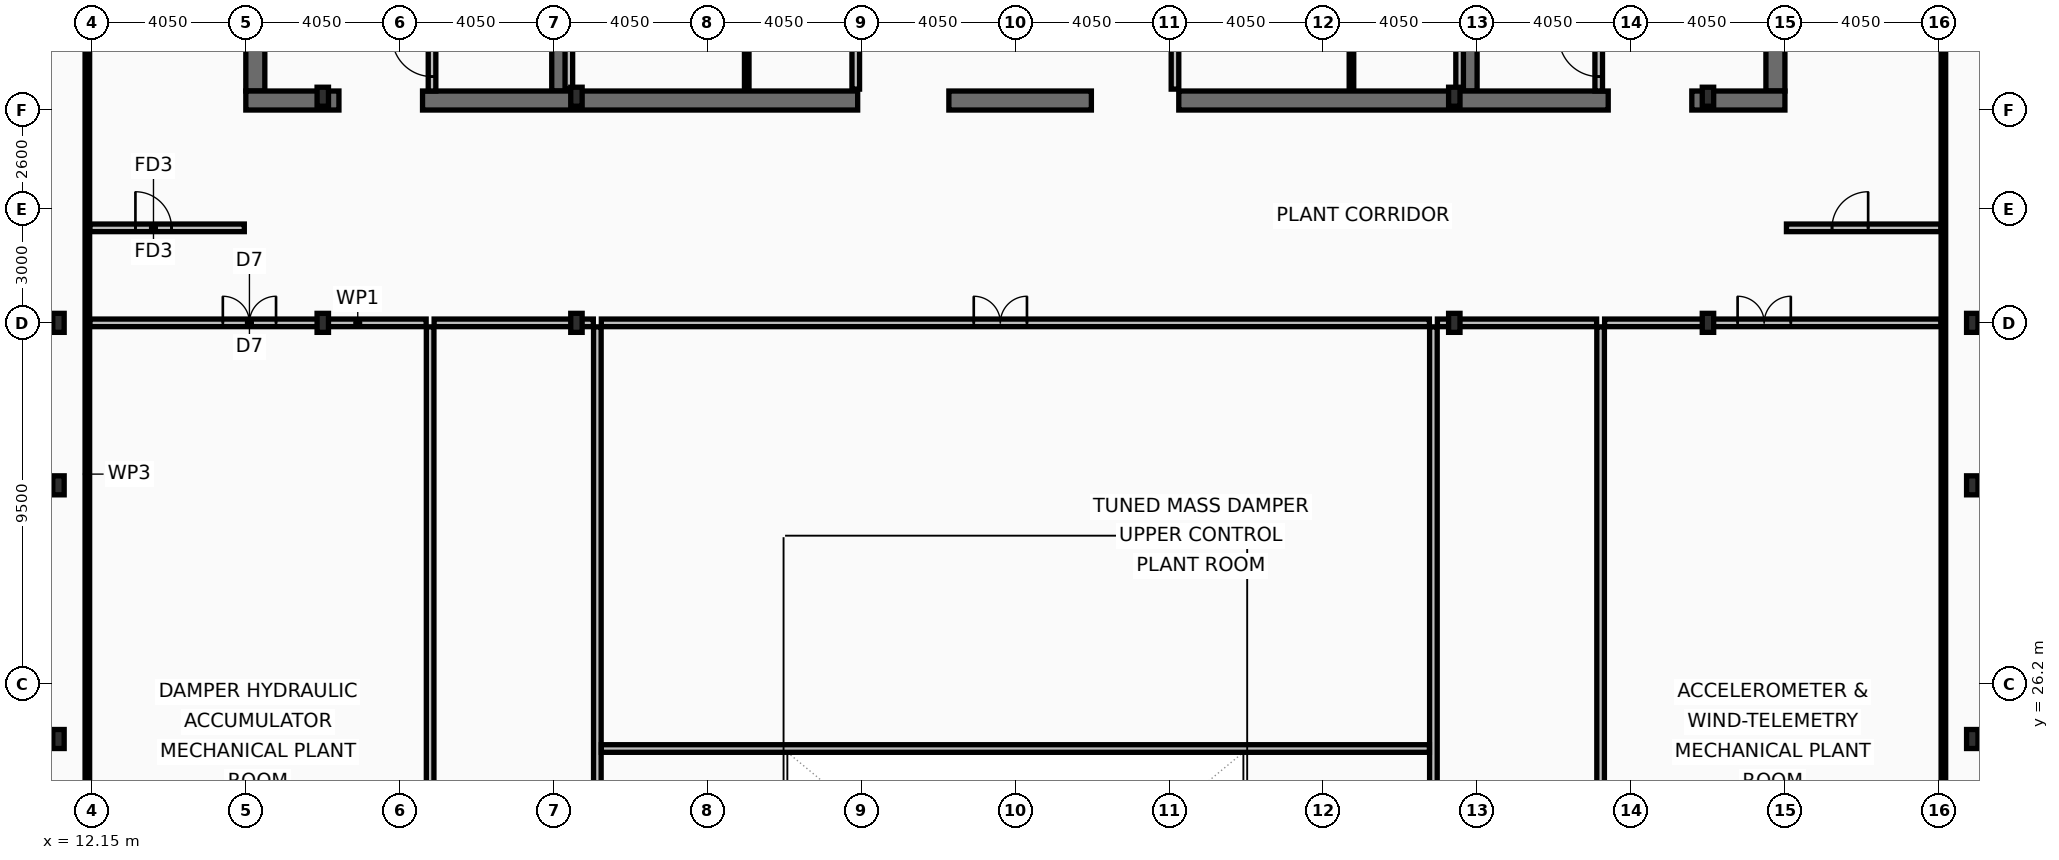
"""IFC4 building model, lengths in metres.
Left out: names, types, materials, properties, quantities, classifications, styles, units other than length and angle.
Written with IfcOpenShell. Run it as: python <this file> out.ifc"""

import sys

from ifc_helpers import new_model, si_unit, direction, frame, frame_2d, origin, origin_2d, place, context, subcontext, project, spatial, rectangle, i_section, extrude, element, fill, save


model = new_model("IFC4")
c1 = context("Model", 3, precision=1e-05, world=origin(), true_north=direction((0.0, 1.0)))
c2 = subcontext(c1, "Body", "Model", "MODEL_VIEW")
j1 = project(units=[si_unit("LENGTHUNIT", "METRE"), si_unit("PLANEANGLEUNIT", "RADIAN")], contexts=[c1])
p1 = place(None, origin())
s1 = spatial("IfcSite", under=j1, at=p1, CompositionType="ELEMENT")
p2 = place(p1, origin())
s2 = spatial("IfcBuilding", under=s1, at=p2, CompositionType="ELEMENT")
p3 = place(p2, frame((0.0, 0.0, 356.2)))
s3 = spatial("IfcBuildingStorey", under=s2, at=p3, CompositionType="ELEMENT", Elevation=356.2)
for number, where, z_axis, x_axis in (
    (1, (16.45, 41.8, 0.0), (0.0, 0.0, 1.0), (0.0, 1.0, 0.0)),
    (2, (56.45, 53.2, 0.0), (0.0, 0.0, 1.0), (0.0, -1.0, 0.0)),
):
    element("IfcWall", number, at=place(p3, frame(where, z_axis=z_axis, x_axis=x_axis)), inside=s3, PredefinedType="SHEAR", context=c2, shape_type="SweptSolid", body=[
        extrude(rectangle(XDim=11.4, YDim=0.5, at=frame_2d((5.7, 0.0))), origin(), (0.0, 0.0, 1.0), 5.4),
    ])
for number, where, z_axis, x_axis in (
    (3, (24.45, 41.8, 0.0), (0.0, 0.0, 1.0), (0.0, 1.0, 0.0)),
    (4, (48.4, 41.8, 0.0), (0.0, 0.0, 1.0), (0.0, 1.0, 0.0)),
):
    element("IfcWall", number, at=place(p3, frame(where, z_axis=z_axis, x_axis=x_axis)), inside=s3, PredefinedType="SHEAR", context=c2, shape_type="SweptSolid", body=[
        extrude(rectangle(XDim=11.4, YDim=0.4, at=frame_2d((5.7, 0.0))), origin(), (0.0, 0.0, 1.0), 5.4),
    ])
p4 = place(p3, frame((18.65, 41.55, 0.0), z_axis=(0.0, 0.0, 1.0), x_axis=(-1.0, 0.0, 0.0)))
e5 = element("IfcWall", 5, at=p4, inside=s3, PredefinedType="SHEAR", context=c2, shape_type="SweptSolid", body=[
    extrude(rectangle(XDim=2.45, YDim=0.5, at=frame_2d((1.225, 0.0))), origin(), (0.0, 0.0, 1.0), 5.4),
])
p5 = place(p3, frame((32.3, 41.55, 0.0), z_axis=(0.0, 0.0, 1.0), x_axis=(-1.0, 0.0, 0.0)))
e6 = element("IfcWall", 6, at=p5, inside=s3, PredefinedType="SHEAR", context=c2, shape_type="SweptSolid", body=[
    extrude(rectangle(XDim=11.45, YDim=0.5, at=frame_2d((5.725, 0.0))), origin(), (0.0, 0.0, 1.0), 5.4),
])
p6 = place(p3, frame((38.45, 41.55, 0.0), z_axis=(0.0, 0.0, 1.0), x_axis=(-1.0, 0.0, 0.0)))
e7 = element("IfcWall", 7, at=p6, inside=s3, PredefinedType="SHEAR", context=c2, shape_type="SweptSolid", body=[
    extrude(rectangle(XDim=3.75, YDim=0.5, at=frame_2d((1.875, 0.0))), origin(), (0.0, 0.0, 1.0), 5.4),
])
p7 = place(p3, frame((52.05, 41.55, 0.0), z_axis=(0.0, 0.0, 1.0), x_axis=(-1.0, 0.0, 0.0)))
e8 = element("IfcWall", 8, at=p7, inside=s3, PredefinedType="SHEAR", context=c2, shape_type="SweptSolid", body=[
    extrude(rectangle(XDim=11.3, YDim=0.5, at=frame_2d((5.65, 0.0))), origin(), (0.0, 0.0, 1.0), 5.4),
])
p8 = place(p3, frame((56.7, 41.55, 0.0), z_axis=(0.0, 0.0, 1.0), x_axis=(-1.0, 0.0, 0.0)))
e9 = element("IfcWall", 9, at=p8, inside=s3, PredefinedType="SHEAR", context=c2, shape_type="SweptSolid", body=[
    extrude(rectangle(XDim=2.45, YDim=0.5, at=frame_2d((1.225, 0.0))), origin(), (0.0, 0.0, 1.0), 5.4),
])
for number, where, z_axis, x_axis in (
    (10, (11.27, 24.75, 0.0), (0.0, 0.0, 1.0), (1.0, 0.0, 0.0)),
    (11, (11.27, 31.425, 0.0), (0.0, 0.0, 1.0), (1.0, 0.0, 0.0)),
    (12, (11.27, 35.7, 0.0), (0.0, 0.0, 1.0), (1.0, 0.0, 0.0)),
    (13, (61.63, 24.75, 0.0), (0.0, 0.0, 1.0), (1.0, 0.0, 0.0)),
    (14, (61.63, 31.425, 0.0), (0.0, 0.0, 1.0), (1.0, 0.0, 0.0)),
    (15, (61.63, 35.7, 0.0), (0.0, 0.0, 1.0), (1.0, 0.0, 0.0)),
    (16, (18.225, 35.7, 0.0), (0.0, 0.0, 1.0), (1.0, 0.0, 0.0)),
    (17, (18.225, 41.65, 0.0), (0.0, 0.0, 1.0), (1.0, 0.0, 0.0)),
    (18, (24.9, 35.7, 0.0), (0.0, 0.0, 1.0), (1.0, 0.0, 0.0)),
    (19, (24.9, 41.65, 0.0), (0.0, 0.0, 1.0), (1.0, 0.0, 0.0)),
    (20, (48.0, 35.7, 0.0), (0.0, 0.0, 1.0), (1.0, 0.0, 0.0)),
    (21, (48.0, 41.65, 0.0), (0.0, 0.0, 1.0), (1.0, 0.0, 0.0)),
    (22, (54.675, 35.7, 0.0), (0.0, 0.0, 1.0), (1.0, 0.0, 0.0)),
    (23, (54.675, 41.65, 0.0), (0.0, 0.0, 1.0), (1.0, 0.0, 0.0)),
):
    element("IfcColumn", number, at=place(p3, frame(where, z_axis=z_axis, x_axis=x_axis)), inside=s3, PredefinedType="COLUMN", context=c2, shape_type="SweptSolid", body=[
        extrude(i_section(OverallWidth=0.3, OverallDepth=0.5, WebThickness=0.014, FlangeThickness=0.028, at=origin_2d()), origin(), (0.0, 0.0, 1.0), 5.6),
    ])
p9 = place(p3, frame((21.1, 41.8, 0.0), z_axis=(0.0, 0.0, 1.0), x_axis=(0.0, 1.0, 0.0)))
e24 = element("IfcWall", 24, at=p9, inside=s3, PredefinedType="PARTITIONING", context=c2, shape_type="SweptSolid", body=[
    extrude(rectangle(XDim=2.695, YDim=0.2, at=frame_2d((1.348, 0.0))), origin(), (0.0, 0.0, 1.0), 5.4),
])
p10 = place(p9, frame((0.38, 0.0, 0.0)))
e25 = element("IfcOpeningElement", 25, at=p10, cuts=e24, PredefinedType="OPENING", context=c2, shape_type="SweptSolid", body=[
    extrude(rectangle(XDim=1.05, YDim=2.15, at=frame_2d((0.525, 1.075))), frame((0.0, 0.11, 0.0), z_axis=(0.0, -1.0, 0.0), x_axis=(1.0, 0.0, 0.0)), (0.0, 0.0, 1.0), 0.22),
])
p11 = place(p3, frame((51.8, 41.8, 0.0), z_axis=(0.0, 0.0, 1.0), x_axis=(0.0, 1.0, 0.0)))
e26 = element("IfcWall", 26, at=p11, inside=s3, PredefinedType="PARTITIONING", context=c2, shape_type="SweptSolid", body=[
    extrude(rectangle(XDim=2.695, YDim=0.2, at=frame_2d((1.348, 0.0))), origin(), (0.0, 0.0, 1.0), 5.4),
])
p12 = place(p11, frame((0.38, 0.0, 0.0)))
e27 = element("IfcOpeningElement", 27, at=p12, cuts=e26, PredefinedType="OPENING", context=c2, shape_type="SweptSolid", body=[
    extrude(rectangle(XDim=1.05, YDim=2.15, at=frame_2d((0.525, 1.075))), frame((0.0, 0.11, 0.0), z_axis=(0.0, -1.0, 0.0), x_axis=(1.0, 0.0, 0.0)), (0.0, 0.0, 1.0), 0.22),
])
for number, where, z_axis, x_axis in (
    (28, (24.7, 41.85, 0.0), (0.0, 0.0, 1.0), (0.0, 1.0, 0.0)),
    (29, (32.25, 41.85, 0.0), (0.0, 0.0, 1.0), (0.0, 1.0, 0.0)),
):
    element("IfcWall", number, at=place(p3, frame(where, z_axis=z_axis, x_axis=x_axis)), inside=s3, PredefinedType="PARTITIONING", context=c2, shape_type="SweptSolid", body=[
        extrude(rectangle(XDim=2.395, YDim=0.2, at=frame_2d((1.198, 0.0))), origin(), (0.0, 0.0, 1.0), 5.4),
    ])
p13 = place(p3, frame((29.381, 41.85, 0.0), z_axis=(0.0, 0.0, 1.0), x_axis=(0.0, 1.0, 0.0)))
e30 = element("IfcWall", 30, at=p13, inside=s3, PredefinedType="PARTITIONING", context=c2, shape_type="SweptSolid", body=[
    extrude(rectangle(XDim=2.395, YDim=0.12, at=frame_2d((1.198, 0.0))), origin(), (0.0, 0.0, 1.0), 5.4),
])
for number, where, z_axis, x_axis in (
    (31, (40.65, 41.85, 0.0), (0.0, 0.0, 1.0), (0.0, 1.0, 0.0)),
    (32, (48.14, 41.85, 0.0), (0.0, 0.0, 1.0), (0.0, 1.0, 0.0)),
):
    element("IfcWall", number, at=place(p3, frame(where, z_axis=z_axis, x_axis=x_axis)), inside=s3, PredefinedType="PARTITIONING", context=c2, shape_type="SweptSolid", body=[
        extrude(rectangle(XDim=2.395, YDim=0.2, at=frame_2d((1.198, 0.0))), origin(), (0.0, 0.0, 1.0), 5.4),
    ])
p14 = place(p3, frame((45.294, 41.85, 0.0), z_axis=(0.0, 0.0, 1.0), x_axis=(0.0, 1.0, 0.0)))
e33 = element("IfcWall", 33, at=p14, inside=s3, PredefinedType="PARTITIONING", context=c2, shape_type="SweptSolid", body=[
    extrude(rectangle(XDim=2.395, YDim=0.12, at=frame_2d((1.198, 0.0))), origin(), (0.0, 0.0, 1.0), 5.4),
])
p15 = place(p3, frame((12.095, 35.7, 0.0), z_axis=(0.0, 0.0, 1.0), x_axis=(1.0, 0.0, 0.0)))
e34 = element("IfcWall", 34, at=p15, inside=s3, PredefinedType="PARTITIONING", context=c2, shape_type="SweptSolid", body=[
    extrude(rectangle(XDim=8.85, YDim=0.2, at=frame_2d((4.425, 0.0))), origin(), (0.0, 0.0, 1.0), 4.79),
])
p16 = place(p15, frame((3.5, 0.0, 0.0)))
e35 = element("IfcOpeningElement", 35, at=p16, cuts=e34, PredefinedType="OPENING", context=c2, shape_type="SweptSolid", body=[
    extrude(rectangle(XDim=1.4, YDim=2.15, at=frame_2d((0.7, 1.075))), frame((0.0, 0.11, 0.0), z_axis=(0.0, -1.0, 0.0), x_axis=(1.0, 0.0, 0.0)), (0.0, 0.0, 1.0), 0.22),
])
p17 = place(p3, frame((21.155, 35.7, 0.0), z_axis=(0.0, 0.0, 1.0), x_axis=(1.0, 0.0, 0.0)))
e36 = element("IfcWall", 36, at=p17, inside=s3, PredefinedType="PARTITIONING", context=c2, shape_type="SweptSolid", body=[
    extrude(rectangle(XDim=4.19, YDim=0.2, at=frame_2d((2.095, 0.0))), origin(), (0.0, 0.0, 1.0), 4.79),
])
p18 = place(p3, frame((25.555, 35.7, 0.0), z_axis=(0.0, 0.0, 1.0), x_axis=(1.0, 0.0, 0.0)))
e37 = element("IfcWall", 37, at=p18, inside=s3, PredefinedType="PARTITIONING", context=c2, shape_type="SweptSolid", body=[
    extrude(rectangle(XDim=21.79, YDim=0.2, at=frame_2d((10.895, 0.0))), origin(), (0.0, 0.0, 1.0), 5.03),
])
p19 = place(p18, frame((9.8, 0.0, 0.0)))
e38 = element("IfcOpeningElement", 38, at=p19, cuts=e37, PredefinedType="OPENING", context=c2, shape_type="SweptSolid", body=[
    extrude(rectangle(XDim=1.4, YDim=2.15, at=frame_2d((0.7, 1.075))), frame((0.0, 0.11, 0.0), z_axis=(0.0, -1.0, 0.0), x_axis=(1.0, 0.0, 0.0)), (0.0, 0.0, 1.0), 0.22),
])
p20 = place(p3, frame((47.555, 35.7, 0.0), z_axis=(0.0, 0.0, 1.0), x_axis=(1.0, 0.0, 0.0)))
e39 = element("IfcWall", 39, at=p20, inside=s3, PredefinedType="PARTITIONING", context=c2, shape_type="SweptSolid", body=[
    extrude(rectangle(XDim=4.19, YDim=0.2, at=frame_2d((2.095, 0.0))), origin(), (0.0, 0.0, 1.0), 4.79),
])
p21 = place(p3, frame((51.955, 35.7, 0.0), z_axis=(0.0, 0.0, 1.0), x_axis=(1.0, 0.0, 0.0)))
e40 = element("IfcWall", 40, at=p21, inside=s3, PredefinedType="PARTITIONING", context=c2, shape_type="SweptSolid", body=[
    extrude(rectangle(XDim=8.85, YDim=0.2, at=frame_2d((4.425, 0.0))), origin(), (0.0, 0.0, 1.0), 4.79),
])
p22 = place(p21, frame((3.5, 0.0, 0.0)))
e41 = element("IfcOpeningElement", 41, at=p22, cuts=e40, PredefinedType="OPENING", context=c2, shape_type="SweptSolid", body=[
    extrude(rectangle(XDim=1.4, YDim=2.15, at=frame_2d((0.7, 1.075))), frame((0.0, 0.11, 0.0), z_axis=(0.0, -1.0, 0.0), x_axis=(1.0, 0.0, 0.0)), (0.0, 0.0, 1.0), 0.22),
])
p23 = place(p3, frame((21.05, 10.565, 0.0), z_axis=(0.0, 0.0, 1.0), x_axis=(0.0, 1.0, 0.0)))
e42 = element("IfcWall", 42, at=p23, inside=s3, PredefinedType="PARTITIONING", context=c2, shape_type="SweptSolid", body=[
    extrude(rectangle(XDim=25.03, YDim=0.2, at=frame_2d((12.515, 0.0))), origin(), (0.0, 0.0, 1.0), 4.84),
])
for number, where, z_axis, x_axis in (
    (43, (25.45, 10.565, 0.0), (0.0, 0.0, 1.0), (0.0, 1.0, 0.0)),
    (44, (47.45, 10.565, 0.0), (0.0, 0.0, 1.0), (0.0, 1.0, 0.0)),
):
    element("IfcWall", number, at=place(p3, frame(where, z_axis=z_axis, x_axis=x_axis)), inside=s3, PredefinedType="PARTITIONING", context=c2, shape_type="SweptSolid", body=[
        extrude(rectangle(XDim=25.03, YDim=0.2, at=frame_2d((12.515, 0.0))), origin(), (0.0, 0.0, 1.0), 4.79),
    ])
p24 = place(p3, frame((51.85, 10.565, 0.0), z_axis=(0.0, 0.0, 1.0), x_axis=(0.0, 1.0, 0.0)))
e45 = element("IfcWall", 45, at=p24, inside=s3, PredefinedType="PARTITIONING", context=c2, shape_type="SweptSolid", body=[
    extrude(rectangle(XDim=25.03, YDim=0.2, at=frame_2d((12.515, 0.0))), origin(), (0.0, 0.0, 1.0), 4.84),
])
p25 = place(p3, frame((25.555, 24.5, 0.0), z_axis=(0.0, 0.0, 1.0), x_axis=(1.0, 0.0, 0.0)))
e46 = element("IfcWall", 46, at=p25, inside=s3, PredefinedType="PARTITIONING", context=c2, shape_type="SweptSolid", body=[
    extrude(rectangle(XDim=21.79, YDim=0.2, at=frame_2d((10.895, 0.0))), origin(), (0.0, 0.0, 1.0), 5.4),
])
p26 = place(p3, frame((12.095, 38.2, 0.0), z_axis=(0.0, 0.0, 1.0), x_axis=(1.0, 0.0, 0.0)))
e47 = element("IfcWall", 47, at=p26, inside=s3, PredefinedType="PARTITIONING", context=c2, shape_type="SweptSolid", body=[
    extrude(rectangle(XDim=4.065, YDim=0.2, at=frame_2d((2.032, 0.0))), origin(), (0.0, 0.0, 1.0), 5.4),
])
p27 = place(p26, frame((1.2, 0.0, 0.0)))
e48 = element("IfcOpeningElement", 48, at=p27, cuts=e47, PredefinedType="OPENING", context=c2, shape_type="SweptSolid", body=[
    extrude(rectangle(XDim=0.95, YDim=2.1, at=frame_2d((0.475, 1.05))), frame((0.0, 0.11, 0.0), z_axis=(0.0, -1.0, 0.0), x_axis=(1.0, 0.0, 0.0)), (0.0, 0.0, 1.0), 0.22),
])
p28 = place(p3, frame((56.74, 38.2, 0.0), z_axis=(0.0, 0.0, 1.0), x_axis=(1.0, 0.0, 0.0)))
e49 = element("IfcWall", 49, at=p28, inside=s3, PredefinedType="PARTITIONING", context=c2, shape_type="SweptSolid", body=[
    extrude(rectangle(XDim=4.065, YDim=0.2, at=frame_2d((2.032, 0.0))), origin(), (0.0, 0.0, 1.0), 5.4),
])
p29 = place(p28, frame((1.2, 0.0, 0.0)))
e50 = element("IfcOpeningElement", 50, at=p29, cuts=e49, PredefinedType="OPENING", context=c2, shape_type="SweptSolid", body=[
    extrude(rectangle(XDim=0.95, YDim=2.1, at=frame_2d((0.475, 1.05))), frame((0.0, 0.11, 0.0), z_axis=(0.0, -1.0, 0.0), x_axis=(1.0, 0.0, 0.0)), (0.0, 0.0, 1.0), 0.22),
])
for number, where, z_axis, x_axis in (
    (51, (12.03, 10.665, 0.0), (0.0, 0.0, 1.0), (0.0, 1.0, 0.0)),
    (52, (60.87, 10.665, 0.0), (0.0, 0.0, 1.0), (0.0, 1.0, 0.0)),
):
    element("IfcWall", number, at=place(p3, frame(where, z_axis=z_axis, x_axis=x_axis)), inside=s3, PredefinedType="PARTITIONING", context=c2, shape_type="SweptSolid", body=[
        extrude(rectangle(XDim=42.11, YDim=0.12, at=frame_2d((21.055, 0.0))), origin(), (0.0, 0.0, 1.0), 4.79),
    ])
p30 = place(p10, origin())
e53 = element("IfcDoor", 53, at=p30, inside=s3, OperationType="SINGLE_SWING_RIGHT", PredefinedType="DOOR", context=c2, shape_type="SweptSolid", body=[
    extrude(rectangle(XDim=1.05, YDim=2.15, at=frame_2d((0.525, 1.075))), frame((0.0, 0.025, 0.0), z_axis=(0.0, -1.0, 0.0), x_axis=(1.0, 0.0, 0.0)), (0.0, 0.0, 1.0), 0.05),
])
fill(e25, e53)
p31 = place(p12, origin())
e54 = element("IfcDoor", 54, at=p31, inside=s3, OperationType="SINGLE_SWING_RIGHT", PredefinedType="DOOR", context=c2, shape_type="SweptSolid", body=[
    extrude(rectangle(XDim=1.05, YDim=2.15, at=frame_2d((0.525, 1.075))), frame((0.0, 0.025, 0.0), z_axis=(0.0, -1.0, 0.0), x_axis=(1.0, 0.0, 0.0)), (0.0, 0.0, 1.0), 0.05),
])
fill(e27, e54)
p32 = place(p16, origin())
e55 = element("IfcDoor", 55, at=p32, inside=s3, OperationType="DOUBLE_DOOR_SINGLE_SWING", PredefinedType="DOOR", context=c2, shape_type="SweptSolid", body=[
    extrude(rectangle(XDim=1.4, YDim=2.15, at=frame_2d((0.7, 1.075))), frame((0.0, 0.025, 0.0), z_axis=(0.0, -1.0, 0.0), x_axis=(1.0, 0.0, 0.0)), (0.0, 0.0, 1.0), 0.05),
])
fill(e35, e55)
p33 = place(p19, origin())
e56 = element("IfcDoor", 56, at=p33, inside=s3, OperationType="DOUBLE_DOOR_SINGLE_SWING", PredefinedType="DOOR", context=c2, shape_type="SweptSolid", body=[
    extrude(rectangle(XDim=1.4, YDim=2.15, at=frame_2d((0.7, 1.075))), frame((0.0, 0.025, 0.0), z_axis=(0.0, -1.0, 0.0), x_axis=(1.0, 0.0, 0.0)), (0.0, 0.0, 1.0), 0.05),
])
fill(e38, e56)
p34 = place(p22, origin())
e57 = element("IfcDoor", 57, at=p34, inside=s3, OperationType="DOUBLE_DOOR_SINGLE_SWING", PredefinedType="DOOR", context=c2, shape_type="SweptSolid", body=[
    extrude(rectangle(XDim=1.4, YDim=2.15, at=frame_2d((0.7, 1.075))), frame((0.0, 0.025, 0.0), z_axis=(0.0, -1.0, 0.0), x_axis=(1.0, 0.0, 0.0)), (0.0, 0.0, 1.0), 0.05),
])
fill(e41, e57)
p35 = place(p27, origin())
e58 = element("IfcDoor", 58, at=p35, inside=s3, OperationType="SINGLE_SWING_LEFT", PredefinedType="DOOR", context=c2, shape_type="SweptSolid", body=[
    extrude(rectangle(XDim=0.95, YDim=2.1, at=frame_2d((0.475, 1.05))), frame((0.0, 0.025, 0.0), z_axis=(0.0, -1.0, 0.0), x_axis=(1.0, 0.0, 0.0)), (0.0, 0.0, 1.0), 0.05),
])
fill(e48, e58)
p36 = place(p29, origin())
e59 = element("IfcDoor", 59, at=p36, inside=s3, OperationType="SINGLE_SWING_RIGHT", PredefinedType="DOOR", context=c2, shape_type="SweptSolid", body=[
    extrude(rectangle(XDim=0.95, YDim=2.1, at=frame_2d((0.475, 1.05))), frame((0.0, 0.025, 0.0), z_axis=(0.0, -1.0, 0.0), x_axis=(1.0, 0.0, 0.0)), (0.0, 0.0, 1.0), 0.05),
])
fill(e50, e59)
save(model, sys.argv[1])
